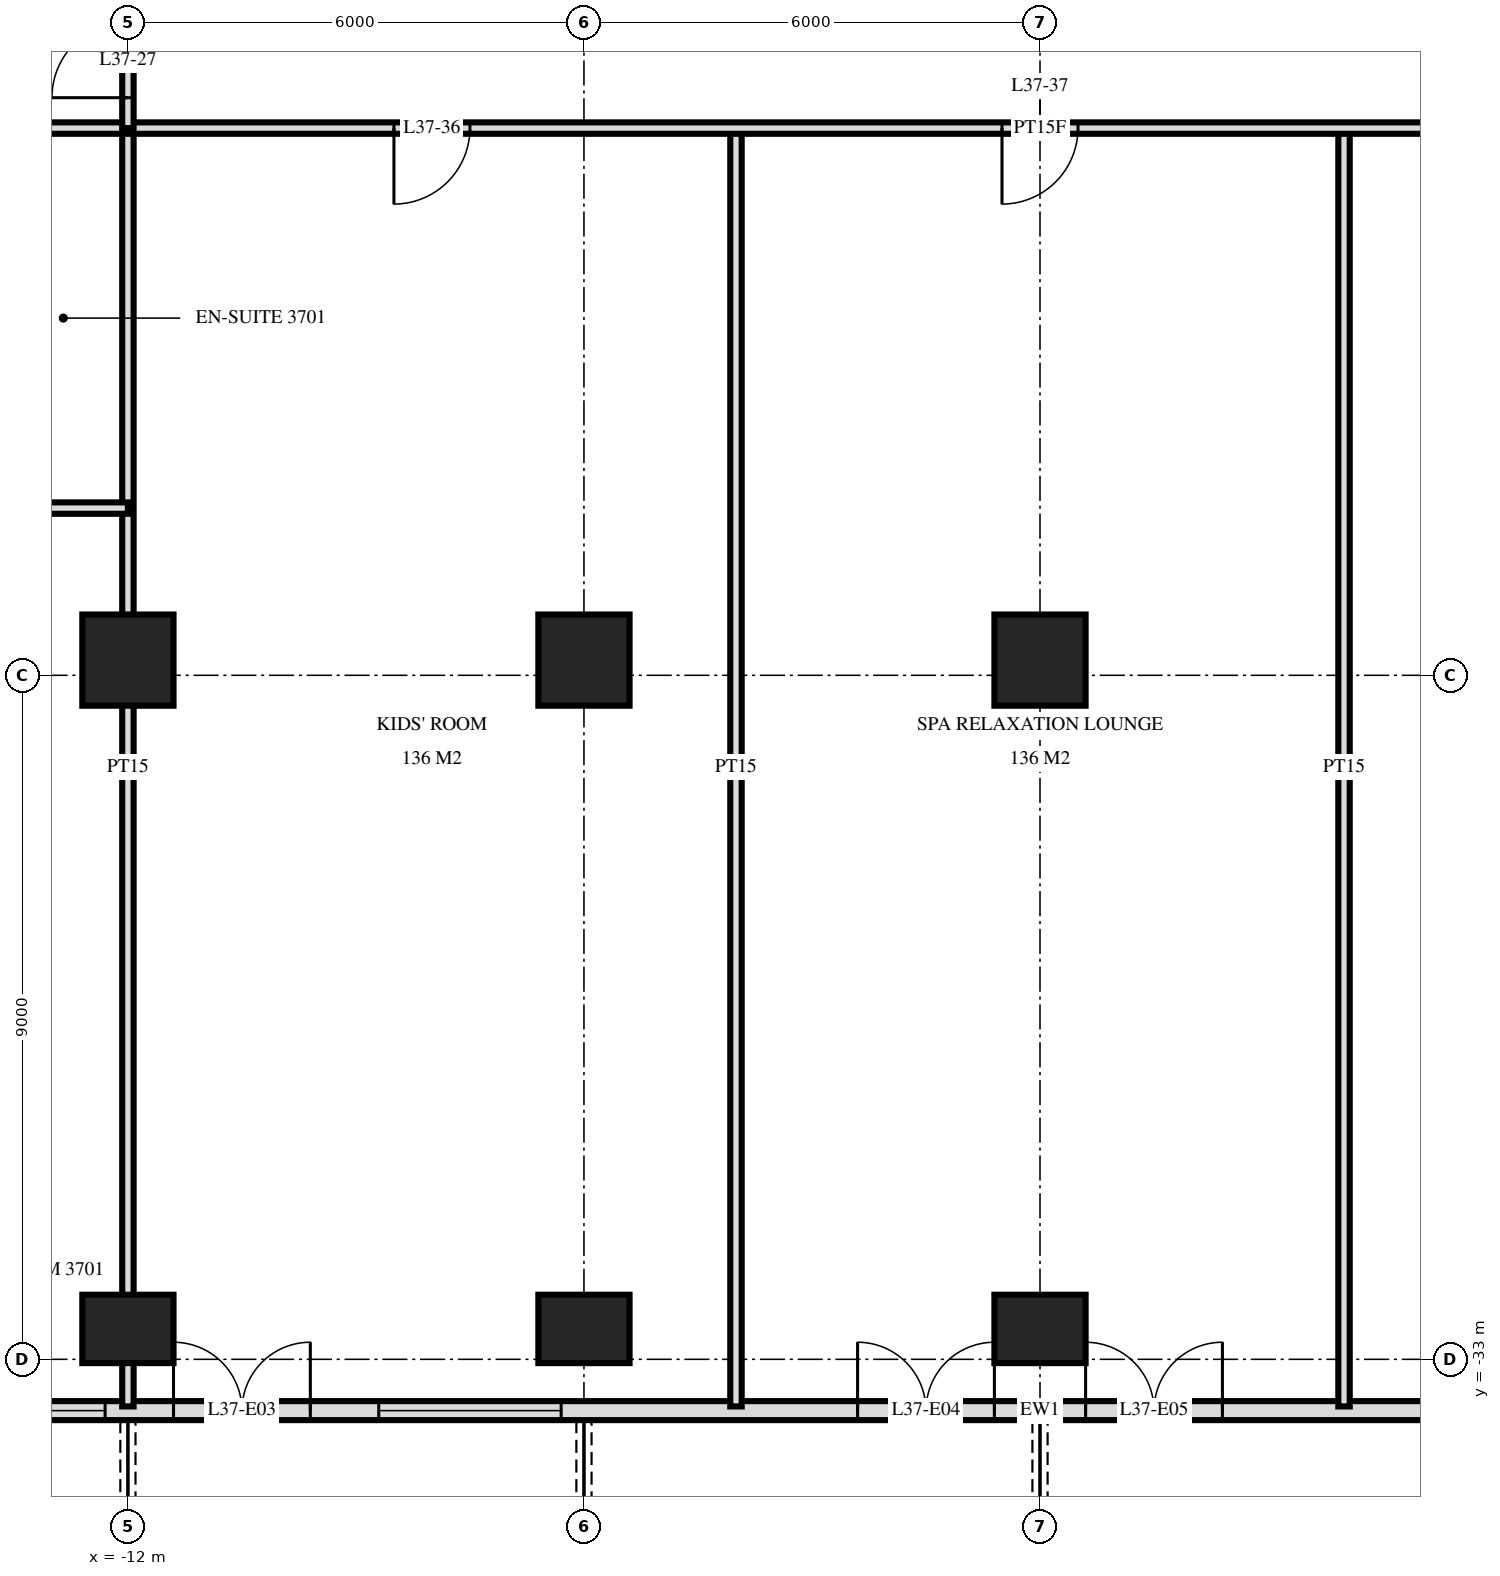
"""IFC4 building model, lengths in metres.
Left out: names, types, materials, properties, quantities, classifications, styles, units other than length and angle.
Written with IfcOpenShell. Run it as: python <this file> out.ifc"""

import sys

from ifc_helpers import new_model, si_unit, direction, frame, frame_2d, origin, origin_2d, place, context, subcontext, project, spatial, rectangle, extrude, element, fill, save


model = new_model("IFC4")
c1 = context("Model", 3, precision=1e-05, world=origin(), true_north=direction((0.0, 1.0)))
c2 = subcontext(c1, "Body", "Model", "MODEL_VIEW")
j1 = project(units=[si_unit("LENGTHUNIT", "METRE"), si_unit("PLANEANGLEUNIT", "RADIAN")], contexts=[c1])
p1 = place(None, origin())
s1 = spatial("IfcSite", under=j1, at=p1, CompositionType="ELEMENT")
p2 = place(p1, origin())
s2 = spatial("IfcBuilding", under=s1, at=p2, CompositionType="ELEMENT")
p3 = place(p2, frame((0.0, 0.0, 145.2)))
s3 = spatial("IfcBuildingStorey", under=s2, at=p3, CompositionType="ELEMENT", Elevation=145.2)
p4 = place(p3, frame((-12.0, -32.6, 0.0), z_axis=(0.0, 0.0, 1.0), x_axis=(1.0, 0.0, 0.0)))
e1 = element("IfcColumn", 1, at=p4, inside=s3, PredefinedType="COLUMN", context=c2, shape_type="SweptSolid", body=[
    extrude(rectangle(XDim=1.2, YDim=0.9, at=origin_2d()), origin(), (0.0, 0.0, 1.0), 3.6),
])
p5 = place(p3, frame((-12.0, -23.8, 0.0), z_axis=(0.0, 0.0, 1.0), x_axis=(1.0, 0.0, 0.0)))
e2 = element("IfcColumn", 2, at=p5, inside=s3, PredefinedType="COLUMN", context=c2, shape_type="SweptSolid", body=[
    extrude(rectangle(XDim=1.2, YDim=1.2, at=origin_2d()), origin(), (0.0, 0.0, 1.0), 3.6),
])
p6 = place(p3, frame((-6.0, -32.6, 0.0), z_axis=(0.0, 0.0, 1.0), x_axis=(1.0, 0.0, 0.0)))
e3 = element("IfcColumn", 3, at=p6, inside=s3, PredefinedType="COLUMN", context=c2, shape_type="SweptSolid", body=[
    extrude(rectangle(XDim=1.2, YDim=0.9, at=origin_2d()), origin(), (0.0, 0.0, 1.0), 3.6),
])
p7 = place(p3, frame((-6.0, -23.8, 0.0), z_axis=(0.0, 0.0, 1.0), x_axis=(1.0, 0.0, 0.0)))
e4 = element("IfcColumn", 4, at=p7, inside=s3, PredefinedType="COLUMN", context=c2, shape_type="SweptSolid", body=[
    extrude(rectangle(XDim=1.2, YDim=1.2, at=origin_2d()), origin(), (0.0, 0.0, 1.0), 3.6),
])
p8 = place(p3, frame((0.0, -32.6, 0.0), z_axis=(0.0, 0.0, 1.0), x_axis=(1.0, 0.0, 0.0)))
e5 = element("IfcColumn", 5, at=p8, inside=s3, PredefinedType="COLUMN", context=c2, shape_type="SweptSolid", body=[
    extrude(rectangle(XDim=1.2, YDim=0.9, at=origin_2d()), origin(), (0.0, 0.0, 1.0), 3.6),
])
p9 = place(p3, frame((0.0, -23.8, 0.0), z_axis=(0.0, 0.0, 1.0), x_axis=(1.0, 0.0, 0.0)))
e6 = element("IfcColumn", 6, at=p9, inside=s3, PredefinedType="COLUMN", context=c2, shape_type="SweptSolid", body=[
    extrude(rectangle(XDim=1.2, YDim=1.2, at=origin_2d()), origin(), (0.0, 0.0, 1.0), 3.6),
])
p10 = place(p3, frame((-23.675, -33.675, 0.0), z_axis=(0.0, 0.0, 1.0), x_axis=(1.0, 0.0, 0.0)))
e7 = element("IfcWall", 7, at=p10, inside=s3, PredefinedType="SOLIDWALL", context=c2, shape_type="SweptSolid", body=[
    extrude(rectangle(XDim=47.351, YDim=0.25, at=frame_2d((23.675, 0.0))), origin(), (0.0, 0.0, 1.0), 3.32),
])
p11 = place(p10, frame((3.425, 0.0, 0.0)))
e8 = element("IfcOpeningElement", 8, at=p11, cuts=e7, PredefinedType="OPENING", context=c2, shape_type="SweptSolid", body=[
    extrude(rectangle(XDim=1.8, YDim=2.4, at=frame_2d((0.9, 1.2))), frame((0.0, 0.135, 0.0), z_axis=(0.0, -1.0, 0.0), x_axis=(1.0, 0.0, 0.0)), (0.0, 0.0, 1.0), 0.27),
])
p12 = place(p10, frame((6.275, 0.0, 0.0)))
e9 = element("IfcOpeningElement", 9, at=p12, cuts=e7, PredefinedType="OPENING", context=c2, shape_type="SweptSolid", body=[
    extrude(rectangle(XDim=1.8, YDim=2.4, at=frame_2d((0.9, 1.2))), frame((0.0, 0.135, 0.0), z_axis=(0.0, -1.0, 0.0), x_axis=(1.0, 0.0, 0.0)), (0.0, 0.0, 1.0), 0.27),
])
p13 = place(p10, frame((8.975, 0.0, 0.3)))
e10 = element("IfcOpeningElement", 10, at=p13, cuts=e7, PredefinedType="OPENING", context=c2, shape_type="SweptSolid", body=[
    extrude(rectangle(XDim=2.4, YDim=2.1, at=frame_2d((1.2, 1.05))), frame((0.0, 0.135, 0.0), z_axis=(0.0, -1.0, 0.0), x_axis=(1.0, 0.0, 0.0)), (0.0, 0.0, 1.0), 0.27),
])
p14 = place(p10, frame((12.275, 0.0, 0.0)))
e11 = element("IfcOpeningElement", 11, at=p14, cuts=e7, PredefinedType="OPENING", context=c2, shape_type="SweptSolid", body=[
    extrude(rectangle(XDim=1.8, YDim=2.4, at=frame_2d((0.9, 1.2))), frame((0.0, 0.135, 0.0), z_axis=(0.0, -1.0, 0.0), x_axis=(1.0, 0.0, 0.0)), (0.0, 0.0, 1.0), 0.27),
])
p15 = place(p10, frame((14.975, 0.0, 0.3)))
e12 = element("IfcOpeningElement", 12, at=p15, cuts=e7, PredefinedType="OPENING", context=c2, shape_type="SweptSolid", body=[
    extrude(rectangle(XDim=2.4, YDim=2.1, at=frame_2d((1.2, 1.05))), frame((0.0, 0.135, 0.0), z_axis=(0.0, -1.0, 0.0), x_axis=(1.0, 0.0, 0.0)), (0.0, 0.0, 1.0), 0.27),
])
p16 = place(p10, frame((21.275, 0.0, 0.0)))
e13 = element("IfcOpeningElement", 13, at=p16, cuts=e7, PredefinedType="OPENING", context=c2, shape_type="SweptSolid", body=[
    extrude(rectangle(XDim=1.8, YDim=2.4, at=frame_2d((0.9, 1.2))), frame((0.0, 0.135, 0.0), z_axis=(0.0, -1.0, 0.0), x_axis=(1.0, 0.0, 0.0)), (0.0, 0.0, 1.0), 0.27),
])
p17 = place(p10, frame((24.275, 0.0, 0.0)))
e14 = element("IfcOpeningElement", 14, at=p17, cuts=e7, PredefinedType="OPENING", context=c2, shape_type="SweptSolid", body=[
    extrude(rectangle(XDim=1.8, YDim=2.4, at=frame_2d((0.9, 1.2))), frame((0.0, 0.135, 0.0), z_axis=(0.0, -1.0, 0.0), x_axis=(1.0, 0.0, 0.0)), (0.0, 0.0, 1.0), 0.27),
])
p18 = place(p10, frame((30.275, 0.0, 0.0)))
e15 = element("IfcOpeningElement", 15, at=p18, cuts=e7, PredefinedType="OPENING", context=c2, shape_type="SweptSolid", body=[
    extrude(rectangle(XDim=1.8, YDim=2.4, at=frame_2d((0.9, 1.2))), frame((0.0, 0.135, 0.0), z_axis=(0.0, -1.0, 0.0), x_axis=(1.0, 0.0, 0.0)), (0.0, 0.0, 1.0), 0.27),
])
p19 = place(p10, frame((32.975, 0.0, 0.3)))
e16 = element("IfcOpeningElement", 16, at=p19, cuts=e7, PredefinedType="OPENING", context=c2, shape_type="SweptSolid", body=[
    extrude(rectangle(XDim=2.4, YDim=2.1, at=frame_2d((1.2, 1.05))), frame((0.0, 0.135, 0.0), z_axis=(0.0, -1.0, 0.0), x_axis=(1.0, 0.0, 0.0)), (0.0, 0.0, 1.0), 0.27),
])
p20 = place(p10, frame((36.275, 0.0, 0.0)))
e17 = element("IfcOpeningElement", 17, at=p20, cuts=e7, PredefinedType="OPENING", context=c2, shape_type="SweptSolid", body=[
    extrude(rectangle(XDim=1.8, YDim=2.4, at=frame_2d((0.9, 1.2))), frame((0.0, 0.135, 0.0), z_axis=(0.0, -1.0, 0.0), x_axis=(1.0, 0.0, 0.0)), (0.0, 0.0, 1.0), 0.27),
])
p21 = place(p10, frame((38.975, 0.0, 0.3)))
e18 = element("IfcOpeningElement", 18, at=p21, cuts=e7, PredefinedType="OPENING", context=c2, shape_type="SweptSolid", body=[
    extrude(rectangle(XDim=2.4, YDim=2.1, at=frame_2d((1.2, 1.05))), frame((0.0, 0.135, 0.0), z_axis=(0.0, -1.0, 0.0), x_axis=(1.0, 0.0, 0.0)), (0.0, 0.0, 1.0), 0.27),
])
p22 = place(p10, frame((42.275, 0.0, 0.0)))
e19 = element("IfcOpeningElement", 19, at=p22, cuts=e7, PredefinedType="OPENING", context=c2, shape_type="SweptSolid", body=[
    extrude(rectangle(XDim=1.8, YDim=2.4, at=frame_2d((0.9, 1.2))), frame((0.0, 0.135, 0.0), z_axis=(0.0, -1.0, 0.0), x_axis=(1.0, 0.0, 0.0)), (0.0, 0.0, 1.0), 0.27),
])
p23 = place(p10, frame((45.125, 0.0, 0.3)))
e20 = element("IfcOpeningElement", 20, at=p23, cuts=e7, PredefinedType="OPENING", context=c2, shape_type="SweptSolid", body=[
    extrude(rectangle(XDim=1.8, YDim=2.1, at=frame_2d((0.9, 1.05))), frame((0.0, 0.135, 0.0), z_axis=(0.0, -1.0, 0.0), x_axis=(1.0, 0.0, 0.0)), (0.0, 0.0, 1.0), 0.27),
])
for number, where, z_axis, x_axis in (
    (21, (4.0, -33.62, 0.0), (0.0, 0.0, 1.0), (0.0, 1.0, 0.0)),
    (22, (-4.0, -33.62, 0.0), (0.0, 0.0, 1.0), (0.0, 1.0, 0.0)),
):
    element("IfcWall", number, at=place(p3, frame(where, z_axis=z_axis, x_axis=x_axis)), inside=s3, PredefinedType="PARTITIONING", context=c2, shape_type="SweptSolid", body=[
        extrude(rectangle(XDim=16.82, YDim=0.15, at=frame_2d((8.41, 0.0))), origin(), (0.0, 0.0, 1.0), 3.32),
    ])
p24 = place(p3, frame((-12.0, -16.8, 0.0), z_axis=(0.0, 0.0, 1.0), x_axis=(0.0, 1.0, 0.0)))
e23 = element("IfcWall", 23, at=p24, inside=s3, PredefinedType="PARTITIONING", context=c2, shape_type="SweptSolid", body=[
    extrude(rectangle(XDim=1.75, YDim=0.15, at=frame_2d((0.875, 0.0))), origin(), (0.0, 0.0, 1.0), 3.32),
])
p25 = place(p24, frame((0.4, 0.0, 0.0)))
e24 = element("IfcOpeningElement", 24, at=p25, cuts=e23, PredefinedType="OPENING", context=c2, shape_type="SweptSolid", body=[
    extrude(rectangle(XDim=1.0, YDim=2.1, at=frame_2d((0.5, 1.05))), frame((0.0, 0.085, 0.0), z_axis=(0.0, -1.0, 0.0), x_axis=(1.0, 0.0, 0.0)), (0.0, 0.0, 1.0), 0.17),
])
p26 = place(p3, frame((-12.0, -33.62, 0.0), z_axis=(0.0, 0.0, 1.0), x_axis=(0.0, 1.0, 0.0)))
e25 = element("IfcWall", 25, at=p26, inside=s3, PredefinedType="PARTITIONING", context=c2, shape_type="SweptSolid", body=[
    extrude(rectangle(XDim=16.82, YDim=0.15, at=frame_2d((8.41, 0.0))), origin(), (0.0, 0.0, 1.0), 3.32),
])
p27 = place(p3, frame((-13.7, -21.8, 0.0), z_axis=(0.0, 0.0, 1.0), x_axis=(1.0, 0.0, 0.0)))
e26 = element("IfcWall", 26, at=p27, inside=s3, PredefinedType="PARTITIONING", context=c2, shape_type="SweptSolid", body=[
    extrude(rectangle(XDim=1.7, YDim=0.15, at=frame_2d((0.85, 0.0))), origin(), (0.0, 0.0, 1.0), 3.32),
])
p28 = place(p3, frame((-28.02, -16.8, 0.0), z_axis=(0.0, 0.0, 1.0), x_axis=(1.0, 0.0, 0.0)))
e27 = element("IfcWall", 27, at=p28, inside=s3, PredefinedType="PARTITIONING", context=c2, shape_type="SweptSolid", body=[
    extrude(rectangle(XDim=56.04, YDim=0.15, at=frame_2d((28.02, 0.0))), origin(), (0.0, 0.0, 1.0), 3.32),
])
p29 = place(p28, frame((13.17, 0.0, 0.0)))
e28 = element("IfcOpeningElement", 28, at=p29, cuts=e27, PredefinedType="OPENING", context=c2, shape_type="SweptSolid", body=[
    extrude(rectangle(XDim=1.0, YDim=2.1, at=frame_2d((0.5, 1.05))), frame((0.0, 0.085, 0.0), z_axis=(0.0, -1.0, 0.0), x_axis=(1.0, 0.0, 0.0)), (0.0, 0.0, 1.0), 0.17),
])
p30 = place(p28, frame((11.32, 0.0, 0.0)))
e29 = element("IfcOpeningElement", 29, at=p30, cuts=e27, PredefinedType="OPENING", context=c2, shape_type="SweptSolid", body=[
    extrude(rectangle(XDim=1.0, YDim=2.1, at=frame_2d((0.5, 1.05))), frame((0.0, 0.085, 0.0), z_axis=(0.0, -1.0, 0.0), x_axis=(1.0, 0.0, 0.0)), (0.0, 0.0, 1.0), 0.17),
])
p31 = place(p28, frame((41.87, 0.0, 0.0)))
e30 = element("IfcOpeningElement", 30, at=p31, cuts=e27, PredefinedType="OPENING", context=c2, shape_type="SweptSolid", body=[
    extrude(rectangle(XDim=1.0, YDim=2.1, at=frame_2d((0.5, 1.05))), frame((0.0, 0.085, 0.0), z_axis=(0.0, -1.0, 0.0), x_axis=(1.0, 0.0, 0.0)), (0.0, 0.0, 1.0), 0.17),
])
p32 = place(p28, frame((43.72, 0.0, 0.0)))
e31 = element("IfcOpeningElement", 31, at=p32, cuts=e27, PredefinedType="OPENING", context=c2, shape_type="SweptSolid", body=[
    extrude(rectangle(XDim=1.0, YDim=2.1, at=frame_2d((0.5, 1.05))), frame((0.0, 0.085, 0.0), z_axis=(0.0, -1.0, 0.0), x_axis=(1.0, 0.0, 0.0)), (0.0, 0.0, 1.0), 0.17),
])
p33 = place(p28, frame((19.52, 0.0, 0.0)))
e32 = element("IfcOpeningElement", 32, at=p33, cuts=e27, PredefinedType="OPENING", context=c2, shape_type="SweptSolid", body=[
    extrude(rectangle(XDim=1.0, YDim=2.1, at=frame_2d((0.5, 1.05))), frame((0.0, 0.085, 0.0), z_axis=(0.0, -1.0, 0.0), x_axis=(1.0, 0.0, 0.0)), (0.0, 0.0, 1.0), 0.17),
])
p34 = place(p28, frame((27.52, 0.0, 0.0)))
e33 = element("IfcOpeningElement", 33, at=p34, cuts=e27, PredefinedType="OPENING", context=c2, shape_type="SweptSolid", body=[
    extrude(rectangle(XDim=1.0, YDim=2.1, at=frame_2d((0.5, 1.05))), frame((0.0, 0.085, 0.0), z_axis=(0.0, -1.0, 0.0), x_axis=(1.0, 0.0, 0.0)), (0.0, 0.0, 1.0), 0.17),
])
p35 = place(p28, frame((35.52, 0.0, 0.0)))
e34 = element("IfcOpeningElement", 34, at=p35, cuts=e27, PredefinedType="OPENING", context=c2, shape_type="SweptSolid", body=[
    extrude(rectangle(XDim=1.0, YDim=2.1, at=frame_2d((0.5, 1.05))), frame((0.0, 0.085, 0.0), z_axis=(0.0, -1.0, 0.0), x_axis=(1.0, 0.0, 0.0)), (0.0, 0.0, 1.0), 0.17),
])
p36 = place(p13, origin())
e35 = element("IfcWindow", 35, at=p36, inside=s3, PartitioningType="SINGLE_PANEL", PredefinedType="WINDOW", context=c2, shape_type="SweptSolid", body=[
    extrude(rectangle(XDim=2.4, YDim=2.1, at=frame_2d((1.2, 1.05))), frame((0.0, 0.03, 0.0), z_axis=(0.0, -1.0, 0.0), x_axis=(1.0, 0.0, 0.0)), (0.0, 0.0, 1.0), 0.06),
])
fill(e10, e35)
p37 = place(p14, origin())
e36 = element("IfcDoor", 36, at=p37, inside=s3, OperationType="DOUBLE_DOOR_SINGLE_SWING", PredefinedType="DOOR", context=c2, shape_type="SweptSolid", body=[
    extrude(rectangle(XDim=1.8, YDim=2.4, at=frame_2d((0.9, 1.2))), frame((0.0, 0.025, 0.0), z_axis=(0.0, -1.0, 0.0), x_axis=(1.0, 0.0, 0.0)), (0.0, 0.0, 1.0), 0.05),
])
fill(e11, e36)
p38 = place(p15, origin())
e37 = element("IfcWindow", 37, at=p38, inside=s3, PartitioningType="SINGLE_PANEL", PredefinedType="WINDOW", context=c2, shape_type="SweptSolid", body=[
    extrude(rectangle(XDim=2.4, YDim=2.1, at=frame_2d((1.2, 1.05))), frame((0.0, 0.03, 0.0), z_axis=(0.0, -1.0, 0.0), x_axis=(1.0, 0.0, 0.0)), (0.0, 0.0, 1.0), 0.06),
])
fill(e12, e37)
p39 = place(p16, origin())
e38 = element("IfcDoor", 38, at=p39, inside=s3, OperationType="DOUBLE_DOOR_SINGLE_SWING", PredefinedType="DOOR", context=c2, shape_type="SweptSolid", body=[
    extrude(rectangle(XDim=1.8, YDim=2.4, at=frame_2d((0.9, 1.2))), frame((0.0, 0.025, 0.0), z_axis=(0.0, -1.0, 0.0), x_axis=(1.0, 0.0, 0.0)), (0.0, 0.0, 1.0), 0.05),
])
fill(e13, e38)
p40 = place(p17, origin())
e39 = element("IfcDoor", 39, at=p40, inside=s3, OperationType="DOUBLE_DOOR_SINGLE_SWING", PredefinedType="DOOR", context=c2, shape_type="SweptSolid", body=[
    extrude(rectangle(XDim=1.8, YDim=2.4, at=frame_2d((0.9, 1.2))), frame((0.0, 0.025, 0.0), z_axis=(0.0, -1.0, 0.0), x_axis=(1.0, 0.0, 0.0)), (0.0, 0.0, 1.0), 0.05),
])
fill(e14, e39)
p41 = place(p25, origin())
e40 = element("IfcDoor", 40, at=p41, inside=s3, OperationType="SINGLE_SWING_RIGHT", PredefinedType="DOOR", context=c2, shape_type="SweptSolid", body=[
    extrude(rectangle(XDim=1.0, YDim=2.1, at=frame_2d((0.5, 1.05))), frame((0.0, 0.025, 0.0), z_axis=(0.0, -1.0, 0.0), x_axis=(1.0, 0.0, 0.0)), (0.0, 0.0, 1.0), 0.05),
])
fill(e24, e40)
p42 = place(p33, frame((0.5, 0.0, 0.0), z_axis=(0.0, 0.0, 1.0), x_axis=(-1.0, 0.0, 0.0)))
e41 = element("IfcDoor", 41, at=p42, inside=s3, OperationType="SINGLE_SWING_LEFT", PredefinedType="DOOR", context=c2, shape_type="SweptSolid", body=[
    extrude(rectangle(XDim=1.0, YDim=2.1, at=frame_2d((0.0, 1.05))), frame((0.0, -0.025, 0.0), z_axis=(0.0, 1.0, 0.0), x_axis=(-1.0, 0.0, 0.0)), (0.0, 0.0, 1.0), 0.05),
])
fill(e32, e41)
p43 = place(p34, frame((0.5, 0.0, 0.0), z_axis=(0.0, 0.0, 1.0), x_axis=(-1.0, 0.0, 0.0)))
e42 = element("IfcDoor", 42, at=p43, inside=s3, OperationType="SINGLE_SWING_LEFT", PredefinedType="DOOR", context=c2, shape_type="SweptSolid", body=[
    extrude(rectangle(XDim=1.0, YDim=2.1, at=frame_2d((0.0, 1.05))), frame((0.0, -0.025, 0.0), z_axis=(0.0, 1.0, 0.0), x_axis=(-1.0, 0.0, 0.0)), (0.0, 0.0, 1.0), 0.05),
])
fill(e33, e42)
save(model, sys.argv[1])
